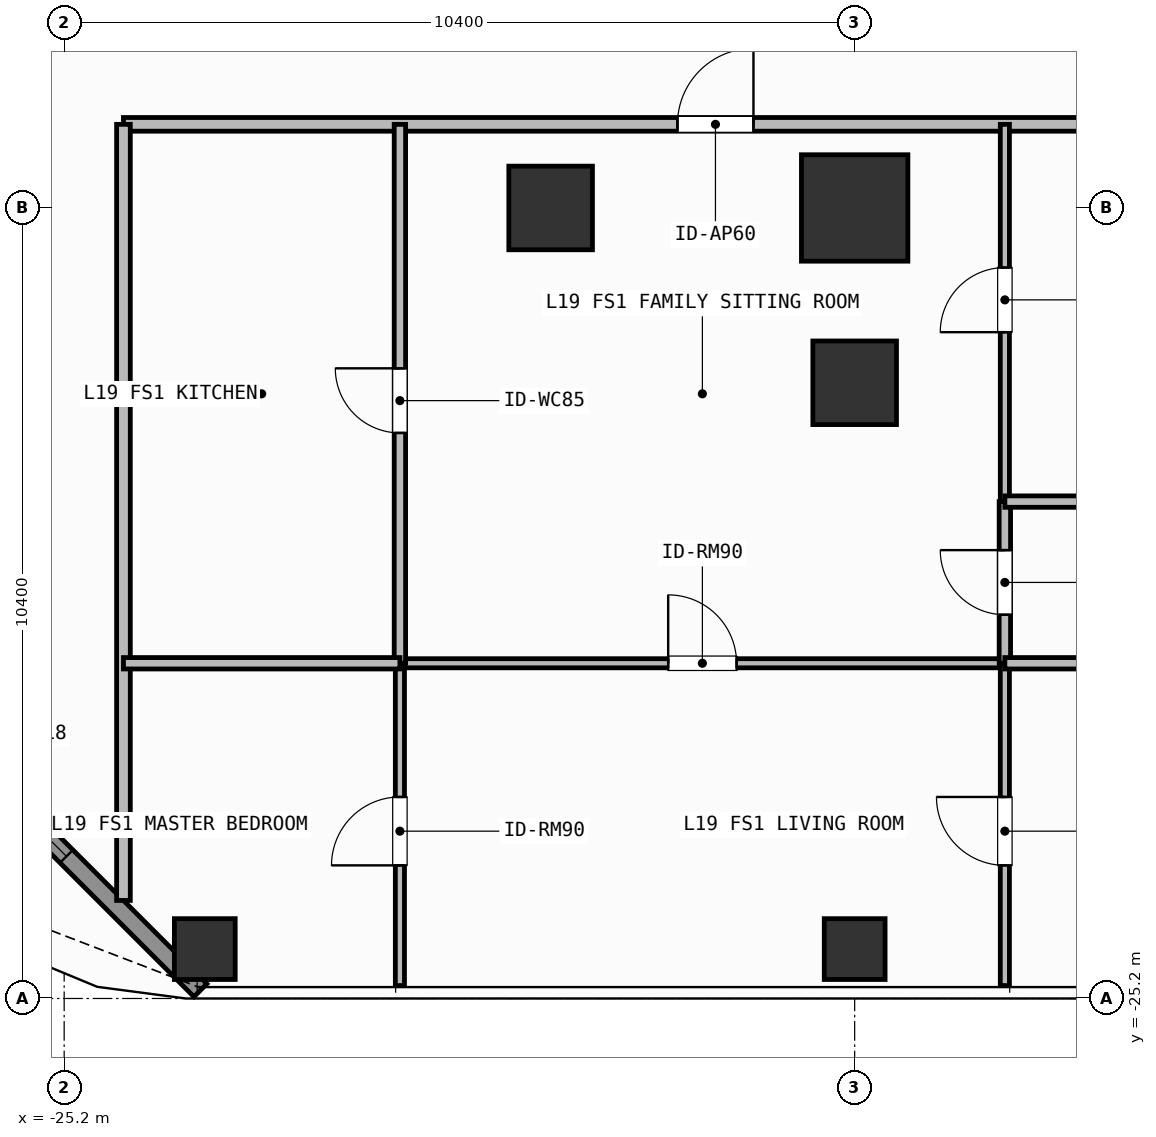
"""IFC4 building model, lengths in metres.
Left out: names, types, materials, properties, quantities, classifications, styles, units other than length and angle.
Written with IfcOpenShell. Run it as: python <this file> out.ifc"""

import sys

from ifc_helpers import new_model, si_unit, direction, frame, frame_2d, origin, origin_2d, place, context, subcontext, project, spatial, rectangle, hollow_rectangle, extrude, element, fill, save


model = new_model("IFC4")
c1 = context("Model", 3, precision=1e-05, world=origin(), true_north=direction((0.0, 1.0)))
c2 = subcontext(c1, "Body", "Model", "MODEL_VIEW")
j1 = project(units=[si_unit("LENGTHUNIT", "METRE"), si_unit("PLANEANGLEUNIT", "RADIAN")], contexts=[c1])
p1 = place(None, origin())
s1 = spatial("IfcSite", under=j1, at=p1, CompositionType="ELEMENT")
p2 = place(p1, origin())
s2 = spatial("IfcBuilding", under=s1, at=p2, CompositionType="ELEMENT")
p3 = place(p2, frame((0.0, 0.0, 73.5)))
s3 = spatial("IfcBuildingStorey", under=s2, at=p3, CompositionType="ELEMENT", Elevation=73.5)
p4 = place(p3, frame((-14.8, -14.8, 0.0), z_axis=(0.0, 0.0, 1.0), x_axis=(1.0, 0.0, 0.0)))
e1 = element("IfcColumn", 1, at=p4, inside=s3, PredefinedType="COLUMN", context=c2, shape_type="SweptSolid", body=[
    extrude(rectangle(XDim=1.4, YDim=1.4, at=origin_2d()), origin(), (0.0, 0.0, 1.0), 3.9),
])
for number, where, z_axis, x_axis in (
    (2, (-18.8, -14.8, 0.0), (0.0, 0.0, 1.0), (1.0, 0.0, 0.0)),
    (3, (-14.8, -17.1, 0.0), (0.0, 0.0, 1.0), (1.0, 0.0, 0.0)),
):
    element("IfcColumn", number, at=place(p3, frame(where, z_axis=z_axis, x_axis=x_axis)), inside=s3, PredefinedType="COLUMN", context=c2, shape_type="SweptSolid", body=[
        extrude(rectangle(XDim=1.1, YDim=1.1, at=origin_2d()), origin(), (0.0, 0.0, 1.0), 3.9),
    ])
for number, where, z_axis, x_axis in (
    (4, (-23.35, -24.55, 0.0), (0.0, 0.0, 1.0), (1.0, 0.0, 0.0)),
    (5, (-14.8, -24.55, 0.0), (0.0, 0.0, 1.0), (1.0, 0.0, 0.0)),
):
    element("IfcColumn", number, at=place(p3, frame(where, z_axis=z_axis, x_axis=x_axis)), inside=s3, PredefinedType="COLUMN", context=c2, shape_type="SweptSolid", body=[
        extrude(hollow_rectangle(XDim=0.8, YDim=0.8, WallThickness=0.036, at=origin_2d()), origin(), (0.0, 0.0, 1.0), 3.9),
    ])
p5 = place(p3, frame((-23.408, -25.092, 0.0), z_axis=(0.0, 0.0, 1.0), x_axis=(-0.707106781187, 0.707106781187, 0.0)))
e6 = element("IfcWall", 6, at=p5, inside=s3, PredefinedType="SOLIDWALL", context=c2, shape_type="SweptSolid", body=[
    extrude(rectangle(XDim=6.484, YDim=0.24, at=frame_2d((3.242, 0.0))), origin(), (0.0, 0.0, 1.0), 3.6),
])
p6 = place(p5, frame((2.492, 0.0, 0.8)))
e7 = element("IfcOpeningElement", 7, at=p6, cuts=e6, PredefinedType="OPENING", context=c2, shape_type="SweptSolid", body=[
    extrude(rectangle(XDim=1.5, YDim=1.85, at=frame_2d((0.75, 0.925))), frame((0.0, 0.13, 0.0), z_axis=(0.0, -1.0, 0.0), x_axis=(1.0, 0.0, 0.0)), (0.0, 0.0, 1.0), 0.26),
])
p7 = place(p3, frame((-24.42, -13.7, 0.0), z_axis=(0.0, 0.0, 1.0), x_axis=(1.0, 0.0, 0.0)))
e8 = element("IfcWall", 8, at=p7, inside=s3, PredefinedType="PARTITIONING", context=c2, shape_type="SweptSolid", body=[
    extrude(rectangle(XDim=17.359, YDim=0.18, at=frame_2d((8.679, 0.0))), origin(), (0.0, 0.0, 1.0), 3.6),
])
p8 = place(p7, frame((7.288, 0.0, 0.0)))
e9 = element("IfcOpeningElement", 9, at=p8, cuts=e8, PredefinedType="OPENING", context=c2, shape_type="SweptSolid", body=[
    extrude(rectangle(XDim=1.0, YDim=2.2, at=frame_2d((0.5, 1.1))), frame((0.0, 0.1, 0.0), z_axis=(0.0, -1.0, 0.0), x_axis=(1.0, 0.0, 0.0)), (0.0, 0.0, 1.0), 0.2),
])
p9 = place(p3, frame((-20.783, -20.79, 0.0), z_axis=(0.0, 0.0, 1.0), x_axis=(1.0, 0.0, 0.0)))
e10 = element("IfcWall", 10, at=p9, inside=s3, PredefinedType="PARTITIONING", context=c2, shape_type="SweptSolid", body=[
    extrude(rectangle(XDim=7.959, YDim=0.12, at=frame_2d((3.979, 0.0))), origin(), (0.0, 0.0, 1.0), 3.6),
])
p10 = place(p9, frame((3.53, 0.0, 0.0)))
e11 = element("IfcOpeningElement", 11, at=p10, cuts=e10, PredefinedType="OPENING", context=c2, shape_type="SweptSolid", body=[
    extrude(rectangle(XDim=0.9, YDim=2.1, at=frame_2d((0.45, 1.05))), frame((0.0, 0.07, 0.0), z_axis=(0.0, -1.0, 0.0), x_axis=(1.0, 0.0, 0.0)), (0.0, 0.0, 1.0), 0.14),
])
p11 = place(p3, frame((-20.783, -20.79, 0.0), z_axis=(0.0, 0.0, 1.0), x_axis=(0.0, 1.0, 0.0)))
e12 = element("IfcWall", 12, at=p11, inside=s3, PredefinedType="PARTITIONING", context=c2, shape_type="SweptSolid", body=[
    extrude(rectangle(XDim=7.09, YDim=0.15, at=frame_2d((3.545, 0.0))), origin(), (0.0, 0.0, 1.0), 3.6),
])
p12 = place(p11, frame((3.03, 0.0, 0.0)))
e13 = element("IfcOpeningElement", 13, at=p12, cuts=e12, PredefinedType="OPENING", context=c2, shape_type="SweptSolid", body=[
    extrude(rectangle(XDim=0.85, YDim=2.1, at=frame_2d((0.425, 1.05))), frame((0.0, 0.085, 0.0), z_axis=(0.0, -1.0, 0.0), x_axis=(1.0, 0.0, 0.0)), (0.0, 0.0, 1.0), 0.17),
])
p13 = place(p3, frame((-20.783, -25.03, 0.0), z_axis=(0.0, 0.0, 1.0), x_axis=(0.0, 1.0, 0.0)))
e14 = element("IfcWall", 14, at=p13, inside=s3, PredefinedType="PARTITIONING", context=c2, shape_type="SweptSolid", body=[
    extrude(rectangle(XDim=4.24, YDim=0.12, at=frame_2d((2.12, 0.0))), origin(), (0.0, 0.0, 1.0), 3.6),
])
p14 = place(p13, frame((1.581, 0.0, 0.0)))
e15 = element("IfcOpeningElement", 15, at=p14, cuts=e14, PredefinedType="OPENING", context=c2, shape_type="SweptSolid", body=[
    extrude(rectangle(XDim=0.9, YDim=2.1, at=frame_2d((0.45, 1.05))), frame((0.0, 0.07, 0.0), z_axis=(0.0, -1.0, 0.0), x_axis=(1.0, 0.0, 0.0)), (0.0, 0.0, 1.0), 0.14),
])
p15 = place(p3, frame((-12.824, -20.79, 0.0), z_axis=(0.0, 0.0, 1.0), x_axis=(0.0, 1.0, 0.0)))
e16 = element("IfcWall", 16, at=p15, inside=s3, PredefinedType="PARTITIONING", context=c2, shape_type="SweptSolid", body=[
    extrude(rectangle(XDim=2.127, YDim=0.15, at=frame_2d((1.063, 0.0))), origin(), (0.0, 0.0, 1.0), 3.6),
])
p16 = place(p15, frame((0.638, 0.0, 0.0)))
e17 = element("IfcOpeningElement", 17, at=p16, cuts=e16, PredefinedType="OPENING", context=c2, shape_type="SweptSolid", body=[
    extrude(rectangle(XDim=0.85, YDim=2.1, at=frame_2d((0.425, 1.05))), frame((0.0, 0.085, 0.0), z_axis=(0.0, -1.0, 0.0), x_axis=(1.0, 0.0, 0.0)), (0.0, 0.0, 1.0), 0.17),
])
p17 = place(p3, frame((-12.824, -18.663, 0.0), z_axis=(0.0, 0.0, 1.0), x_axis=(0.0, 1.0, 0.0)))
e18 = element("IfcWall", 18, at=p17, inside=s3, PredefinedType="PARTITIONING", context=c2, shape_type="SweptSolid", body=[
    extrude(rectangle(XDim=4.963, YDim=0.12, at=frame_2d((2.481, 0.0))), origin(), (0.0, 0.0, 1.0), 3.6),
])
p18 = place(p17, frame((2.229, 0.0, 0.0)))
e19 = element("IfcOpeningElement", 19, at=p18, cuts=e18, PredefinedType="OPENING", context=c2, shape_type="SweptSolid", body=[
    extrude(rectangle(XDim=0.85, YDim=2.1, at=frame_2d((0.425, 1.05))), frame((0.0, 0.07, 0.0), z_axis=(0.0, -1.0, 0.0), x_axis=(1.0, 0.0, 0.0)), (0.0, 0.0, 1.0), 0.14),
])
p19 = place(p3, frame((-12.824, -25.03, 0.0), z_axis=(0.0, 0.0, 1.0), x_axis=(0.0, 1.0, 0.0)))
e20 = element("IfcWall", 20, at=p19, inside=s3, PredefinedType="PARTITIONING", context=c2, shape_type="SweptSolid", body=[
    extrude(rectangle(XDim=4.24, YDim=0.12, at=frame_2d((2.12, 0.0))), origin(), (0.0, 0.0, 1.0), 3.6),
])
p20 = place(p19, frame((1.581, 0.0, 0.0)))
e21 = element("IfcOpeningElement", 21, at=p20, cuts=e20, PredefinedType="OPENING", context=c2, shape_type="SweptSolid", body=[
    extrude(rectangle(XDim=0.9, YDim=2.1, at=frame_2d((0.45, 1.05))), frame((0.0, 0.07, 0.0), z_axis=(0.0, -1.0, 0.0), x_axis=(1.0, 0.0, 0.0)), (0.0, 0.0, 1.0), 0.14),
])
p21 = place(p3, frame((-24.42, -23.91, 0.0), z_axis=(0.0, 0.0, 1.0), x_axis=(0.0, 1.0, 0.0)))
e22 = element("IfcWall", 22, at=p21, inside=s3, PredefinedType="PARTITIONING", context=c2, shape_type="SweptSolid", body=[
    extrude(rectangle(XDim=10.21, YDim=0.18, at=frame_2d((5.105, 0.0))), origin(), (0.0, 0.0, 1.0), 3.6),
])
p22 = place(p3, frame((-24.42, -20.79, 0.0), z_axis=(0.0, 0.0, 1.0), x_axis=(1.0, 0.0, 0.0)))
e23 = element("IfcWall", 23, at=p22, inside=s3, PredefinedType="PARTITIONING", context=c2, shape_type="SweptSolid", body=[
    extrude(rectangle(XDim=3.637, YDim=0.15, at=frame_2d((1.818, 0.0))), origin(), (0.0, 0.0, 1.0), 3.6),
])
for number, where, z_axis, x_axis in (
    (24, (-12.824, -18.663, 0.0), (0.0, 0.0, 1.0), (1.0, 0.0, 0.0)),
    (25, (-12.824, -20.79, 0.0), (0.0, 0.0, 1.0), (1.0, 0.0, 0.0)),
):
    element("IfcWall", number, at=place(p3, frame(where, z_axis=z_axis, x_axis=x_axis)), inside=s3, PredefinedType="PARTITIONING", context=c2, shape_type="SweptSolid", body=[
        extrude(rectangle(XDim=5.763, YDim=0.15, at=frame_2d((2.881, 0.0))), origin(), (0.0, 0.0, 1.0), 3.6),
    ])
p23 = place(p6, origin())
e26 = element("IfcWindow", 26, at=p23, inside=s3, PartitioningType="SINGLE_PANEL", PredefinedType="WINDOW", context=c2, shape_type="SweptSolid", body=[
    extrude(rectangle(XDim=1.5, YDim=1.85, at=frame_2d((0.75, 0.925))), frame((0.0, 0.03, 0.0), z_axis=(0.0, -1.0, 0.0), x_axis=(1.0, 0.0, 0.0)), (0.0, 0.0, 1.0), 0.06),
])
fill(e7, e26)
p24 = place(p8, origin())
e27 = element("IfcDoor", 27, at=p24, inside=s3, OperationType="SINGLE_SWING_RIGHT", PredefinedType="DOOR", context=c2, shape_type="SweptSolid", body=[
    extrude(rectangle(XDim=1.0, YDim=2.2, at=frame_2d((0.5, 1.1))), frame((0.0, 0.025, 0.0), z_axis=(0.0, -1.0, 0.0), x_axis=(1.0, 0.0, 0.0)), (0.0, 0.0, 1.0), 0.05),
])
fill(e9, e27)
p25 = place(p10, origin())
e28 = element("IfcDoor", 28, at=p25, inside=s3, OperationType="SINGLE_SWING_LEFT", PredefinedType="DOOR", context=c2, shape_type="SweptSolid", body=[
    extrude(rectangle(XDim=0.9, YDim=2.1, at=frame_2d((0.45, 1.05))), frame((0.0, 0.025, 0.0), z_axis=(0.0, -1.0, 0.0), x_axis=(1.0, 0.0, 0.0)), (0.0, 0.0, 1.0), 0.05),
])
fill(e11, e28)
p26 = place(p12, origin())
e29 = element("IfcDoor", 29, at=p26, inside=s3, OperationType="SINGLE_SWING_RIGHT", PredefinedType="DOOR", context=c2, shape_type="SweptSolid", body=[
    extrude(rectangle(XDim=0.85, YDim=2.1, at=frame_2d((0.425, 1.05))), frame((0.0, 0.025, 0.0), z_axis=(0.0, -1.0, 0.0), x_axis=(1.0, 0.0, 0.0)), (0.0, 0.0, 1.0), 0.05),
])
fill(e13, e29)
p27 = place(p14, origin())
e30 = element("IfcDoor", 30, at=p27, inside=s3, OperationType="SINGLE_SWING_LEFT", PredefinedType="DOOR", context=c2, shape_type="SweptSolid", body=[
    extrude(rectangle(XDim=0.9, YDim=2.1, at=frame_2d((0.45, 1.05))), frame((0.0, 0.025, 0.0), z_axis=(0.0, -1.0, 0.0), x_axis=(1.0, 0.0, 0.0)), (0.0, 0.0, 1.0), 0.05),
])
fill(e15, e30)
p28 = place(p16, origin())
e31 = element("IfcDoor", 31, at=p28, inside=s3, OperationType="SINGLE_SWING_RIGHT", PredefinedType="DOOR", context=c2, shape_type="SweptSolid", body=[
    extrude(rectangle(XDim=0.85, YDim=2.1, at=frame_2d((0.425, 1.05))), frame((0.0, 0.025, 0.0), z_axis=(0.0, -1.0, 0.0), x_axis=(1.0, 0.0, 0.0)), (0.0, 0.0, 1.0), 0.05),
])
fill(e17, e31)
p29 = place(p18, origin())
e32 = element("IfcDoor", 32, at=p29, inside=s3, OperationType="SINGLE_SWING_LEFT", PredefinedType="DOOR", context=c2, shape_type="SweptSolid", body=[
    extrude(rectangle(XDim=0.85, YDim=2.1, at=frame_2d((0.425, 1.05))), frame((0.0, 0.025, 0.0), z_axis=(0.0, -1.0, 0.0), x_axis=(1.0, 0.0, 0.0)), (0.0, 0.0, 1.0), 0.05),
])
fill(e19, e32)
p30 = place(p20, origin())
e33 = element("IfcDoor", 33, at=p30, inside=s3, OperationType="SINGLE_SWING_RIGHT", PredefinedType="DOOR", context=c2, shape_type="SweptSolid", body=[
    extrude(rectangle(XDim=0.9, YDim=2.1, at=frame_2d((0.45, 1.05))), frame((0.0, 0.025, 0.0), z_axis=(0.0, -1.0, 0.0), x_axis=(1.0, 0.0, 0.0)), (0.0, 0.0, 1.0), 0.05),
])
fill(e21, e33)
save(model, sys.argv[1])
